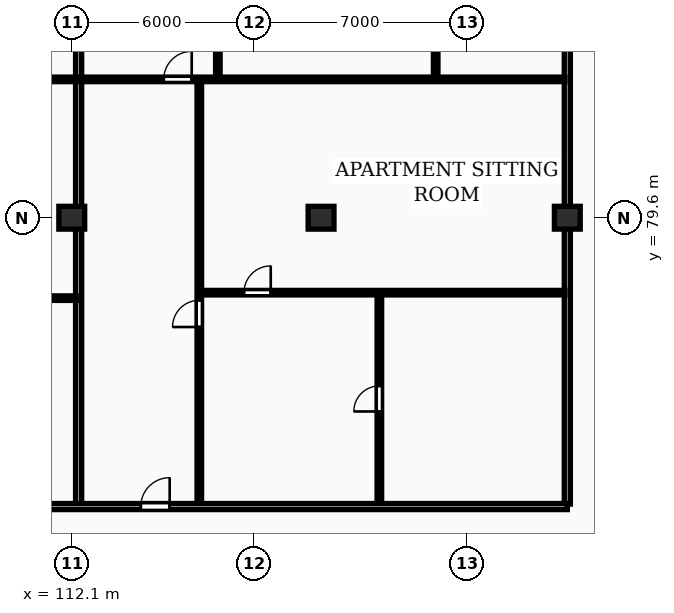
"""IFC4 building model, lengths in metres.
Left out: names, types, materials, properties, quantities, classifications, styles, units other than length and angle.
Written with IfcOpenShell. Run it as: python <this file> out.ifc"""

import sys

from ifc_helpers import new_model, si_unit, direction, frame, frame_2d, origin, origin_2d, place, context, subcontext, project, spatial, rectangle, extrude, element, fill, save


model = new_model("IFC4")
c1 = context("Model", 3, precision=1e-05, world=origin(), true_north=direction((0.0, 1.0)))
c2 = subcontext(c1, "Body", "Model", "MODEL_VIEW")
j1 = project(units=[si_unit("LENGTHUNIT", "METRE"), si_unit("PLANEANGLEUNIT", "RADIAN")], contexts=[c1])
p1 = place(None, origin())
s1 = spatial("IfcSite", under=j1, at=p1, CompositionType="ELEMENT")
p2 = place(p1, origin())
s2 = spatial("IfcBuilding", under=s1, at=p2, CompositionType="ELEMENT")
p3 = place(p2, frame((0.0, 0.0, 201.1)))
s3 = spatial("IfcBuildingStorey", under=s2, at=p3, CompositionType="ELEMENT", Elevation=201.1)
for number, where, z_axis, x_axis in (
    (1, (112.1, 79.6, 0.0), (0.0, 0.0, 1.0), (1.0, 0.0, 0.0)),
    (2, (120.3, 79.6, 0.0), (0.0, 0.0, 1.0), (1.0, 0.0, 0.0)),
    (3, (128.4, 79.6, 0.0), (0.0, 0.0, 1.0), (1.0, 0.0, 0.0)),
):
    element("IfcColumn", number, at=place(p3, frame(where, z_axis=z_axis, x_axis=x_axis)), inside=s3, PredefinedType="COLUMN", context=c2, shape_type="SweptSolid", body=[
        extrude(rectangle(XDim=0.85, YDim=0.75, at=origin_2d()), origin(), (0.0, 0.0, 1.0), 3.25),
    ])
for number, where, z_axis, x_axis in (
    (4, (128.4, 70.18, 0.0), (0.0, 0.0, 1.0), (0.0, 1.0, 0.0)),
    (5, (112.326, 70.18, 0.0), (0.0, 0.0, 1.0), (0.0, 1.0, 0.0)),
):
    element("IfcWall", number, at=place(p3, frame(where, z_axis=z_axis, x_axis=x_axis)), inside=s3, PredefinedType="PARTITIONING", context=c2, shape_type="SweptSolid", body=[
        extrude(rectangle(XDim=24.32, YDim=0.2, at=frame_2d((12.16, 0.0))), origin(), (0.0, 0.0, 1.0), 2.277),
    ])
p4 = place(p3, frame((100.242, 76.955, 0.0), z_axis=(0.0, 0.0, 1.0), x_axis=(1.0, 0.0, 0.0)))
e6 = element("IfcWall", 6, at=p4, inside=s3, PredefinedType="PARTITIONING", context=c2, shape_type="SweptSolid", body=[
    extrude(rectangle(XDim=12.004, YDim=0.15, at=frame_2d((6.002, 0.0))), origin(), (0.0, 0.0, 1.0), 2.97),
])
p5 = place(p4, frame((4.909, 0.0, 0.0)))
e7 = element("IfcOpeningElement", 7, at=p5, cuts=e6, PredefinedType="OPENING", context=c2, shape_type="SweptSolid", body=[
    extrude(rectangle(XDim=0.88, YDim=2.06, at=frame_2d((0.44, 1.03))), frame((0.0, 0.085, 0.0), z_axis=(0.0, -1.0, 0.0), x_axis=(1.0, 0.0, 0.0)), (0.0, 0.0, 1.0), 0.17),
])
p6 = place(p3, frame((96.292, 84.15, 0.0), z_axis=(0.0, 0.0, 1.0), x_axis=(1.0, 0.0, 0.0)))
e8 = element("IfcWall", 8, at=p6, inside=s3, PredefinedType="PARTITIONING", context=c2, shape_type="SweptSolid", body=[
    extrude(rectangle(XDim=15.954, YDim=0.15, at=frame_2d((7.977, 0.0))), origin(), (0.0, 0.0, 1.0), 2.97),
])
p7 = place(p6, frame((2.72, 0.0, 0.0)))
e9 = element("IfcOpeningElement", 9, at=p7, cuts=e8, PredefinedType="OPENING", context=c2, shape_type="SweptSolid", body=[
    extrude(rectangle(XDim=0.92, YDim=2.08, at=frame_2d((0.46, 1.04))), frame((0.0, 0.085, 0.0), z_axis=(0.0, -1.0, 0.0), x_axis=(1.0, 0.0, 0.0)), (0.0, 0.0, 1.0), 0.17),
])
p8 = place(p3, frame((122.218, 70.16, 0.0), z_axis=(0.0, 0.0, 1.0), x_axis=(0.0, 1.0, 0.0)))
e10 = element("IfcWall", 10, at=p8, inside=s3, PredefinedType="PARTITIONING", context=c2, shape_type="SweptSolid", body=[
    extrude(rectangle(XDim=6.975, YDim=0.15, at=frame_2d((3.488, 0.0))), origin(), (0.0, 0.0, 1.0), 2.97),
])
p9 = place(p8, frame((3.067, 0.0, 0.0)))
e11 = element("IfcOpeningElement", 11, at=p9, cuts=e10, PredefinedType="OPENING", context=c2, shape_type="SweptSolid", body=[
    extrude(rectangle(XDim=0.84, YDim=2.04, at=frame_2d((0.42, 1.02))), frame((0.0, 0.085, 0.0), z_axis=(0.0, -1.0, 0.0), x_axis=(1.0, 0.0, 0.0)), (0.0, 0.0, 1.0), 0.17),
])
p10 = place(p3, frame((116.356, 77.135, 0.0), z_axis=(0.0, 0.0, 1.0), x_axis=(1.0, 0.0, 0.0)))
e12 = element("IfcWall", 12, at=p10, inside=s3, PredefinedType="PARTITIONING", context=c2, shape_type="SweptSolid", body=[
    extrude(rectangle(XDim=11.964, YDim=0.15, at=frame_2d((5.982, 0.0))), origin(), (0.0, 0.0, 1.0), 2.97),
])
p11 = place(p10, frame((1.409, 0.0, 0.0)))
e13 = element("IfcOpeningElement", 13, at=p11, cuts=e12, PredefinedType="OPENING", context=c2, shape_type="SweptSolid", body=[
    extrude(rectangle(XDim=0.88, YDim=2.06, at=frame_2d((0.44, 1.03))), frame((0.0, 0.085, 0.0), z_axis=(0.0, -1.0, 0.0), x_axis=(1.0, 0.0, 0.0)), (0.0, 0.0, 1.0), 0.17),
])
p12 = place(p3, frame((116.296, 70.16, 0.0), z_axis=(0.0, 0.0, 1.0), x_axis=(0.0, 1.0, 0.0)))
e14 = element("IfcWall", 14, at=p12, inside=s3, PredefinedType="PARTITIONING", context=c2, shape_type="SweptSolid", body=[
    extrude(rectangle(XDim=13.95, YDim=0.15, at=frame_2d((6.975, 0.0))), origin(), (0.0, 0.0, 1.0), 2.97),
])
p13 = place(p12, frame((5.845, 0.0, 0.0)))
e15 = element("IfcOpeningElement", 15, at=p13, cuts=e14, PredefinedType="OPENING", context=c2, shape_type="SweptSolid", body=[
    extrude(rectangle(XDim=0.88, YDim=2.06, at=frame_2d((0.44, 1.03))), frame((0.0, 0.085, 0.0), z_axis=(0.0, -1.0, 0.0), x_axis=(1.0, 0.0, 0.0)), (0.0, 0.0, 1.0), 0.17),
])
p14 = place(p3, frame((116.906, 84.19, 0.0), z_axis=(0.0, 0.0, 1.0), x_axis=(0.0, 1.0, 0.0)))
e16 = element("IfcWall", 16, at=p14, inside=s3, PredefinedType="PARTITIONING", context=c2, shape_type="SweptSolid", body=[
    extrude(rectangle(XDim=10.31, YDim=0.15, at=frame_2d((5.155, 0.0))), origin(), (0.0, 0.0, 1.0), 2.97),
])
p15 = place(p14, frame((3.82, 0.0, 0.0)))
e17 = element("IfcOpeningElement", 17, at=p15, cuts=e16, PredefinedType="OPENING", context=c2, shape_type="SweptSolid", body=[
    extrude(rectangle(XDim=0.92, YDim=2.08, at=frame_2d((0.46, 1.04))), frame((0.0, 0.085, 0.0), z_axis=(0.0, -1.0, 0.0), x_axis=(1.0, 0.0, 0.0)), (0.0, 0.0, 1.0), 0.17),
])
p16 = place(p3, frame((124.07, 84.19, 0.0), z_axis=(0.0, 0.0, 1.0), x_axis=(0.0, 1.0, 0.0)))
e18 = element("IfcWall", 18, at=p16, inside=s3, PredefinedType="PARTITIONING", context=c2, shape_type="SweptSolid", body=[
    extrude(rectangle(XDim=2.58, YDim=0.15, at=frame_2d((1.29, 0.0))), origin(), (0.0, 0.0, 1.0), 2.97),
])
p17 = place(p3, frame((112.406, 84.15, 0.0), z_axis=(0.0, 0.0, 1.0), x_axis=(1.0, 0.0, 0.0)))
e19 = element("IfcWall", 19, at=p17, inside=s3, PredefinedType="PARTITIONING", context=c2, shape_type="SweptSolid", body=[
    extrude(rectangle(XDim=15.915, YDim=0.15, at=frame_2d((7.957, 0.0))), origin(), (0.0, 0.0, 1.0), 2.97),
])
p18 = place(p17, frame((2.72, 0.0, 0.0)))
e20 = element("IfcOpeningElement", 20, at=p18, cuts=e19, PredefinedType="OPENING", context=c2, shape_type="SweptSolid", body=[
    extrude(rectangle(XDim=0.92, YDim=2.08, at=frame_2d((0.46, 1.04))), frame((0.0, 0.085, 0.0), z_axis=(0.0, -1.0, 0.0), x_axis=(1.0, 0.0, 0.0)), (0.0, 0.0, 1.0), 0.17),
])
p19 = place(p3, frame((59.8, 70.1, 0.0), z_axis=(0.0, 0.0, 1.0), x_axis=(1.0, 0.0, 0.0)))
e21 = element("IfcWall", 21, at=p19, inside=s3, PredefinedType="PARTITIONING", context=c2, shape_type="SweptSolid", body=[
    extrude(rectangle(XDim=68.6, YDim=0.2, at=frame_2d((34.3, 0.0))), origin(), (0.0, 0.0, 1.0), 2.97),
])
p20 = place(p19, frame((7.281, 0.0, 0.0)))
e22 = element("IfcOpeningElement", 22, at=p20, cuts=e21, PredefinedType="OPENING", context=c2, shape_type="SweptSolid", body=[
    extrude(rectangle(XDim=1.22, YDim=2.18, at=frame_2d((0.61, 1.09))), frame((0.0, 0.11, 0.0), z_axis=(0.0, -1.0, 0.0), x_axis=(1.0, 0.0, 0.0)), (0.0, 0.0, 1.0), 0.22),
])
p21 = place(p19, frame((25.602, 0.0, 0.0)))
e23 = element("IfcOpeningElement", 23, at=p21, cuts=e21, PredefinedType="OPENING", context=c2, shape_type="SweptSolid", body=[
    extrude(rectangle(XDim=1.22, YDim=2.18, at=frame_2d((0.61, 1.09))), frame((0.0, 0.11, 0.0), z_axis=(0.0, -1.0, 0.0), x_axis=(1.0, 0.0, 0.0)), (0.0, 0.0, 1.0), 0.22),
])
p22 = place(p19, frame((38.457, 0.0, 0.0)))
e24 = element("IfcOpeningElement", 24, at=p22, cuts=e21, PredefinedType="OPENING", context=c2, shape_type="SweptSolid", body=[
    extrude(rectangle(XDim=0.95, YDim=2.15, at=frame_2d((0.475, 1.075))), frame((0.0, 0.11, 0.0), z_axis=(0.0, -1.0, 0.0), x_axis=(1.0, 0.0, 0.0)), (0.0, 0.0, 1.0), 0.22),
])
p23 = place(p19, frame((54.571, 0.0, 0.0)))
e25 = element("IfcOpeningElement", 25, at=p23, cuts=e21, PredefinedType="OPENING", context=c2, shape_type="SweptSolid", body=[
    extrude(rectangle(XDim=0.95, YDim=2.15, at=frame_2d((0.475, 1.075))), frame((0.0, 0.11, 0.0), z_axis=(0.0, -1.0, 0.0), x_axis=(1.0, 0.0, 0.0)), (0.0, 0.0, 1.0), 0.22),
])
p24 = place(p9, origin())
e26 = element("IfcDoor", 26, at=p24, inside=s3, OperationType="SINGLE_SWING_LEFT", PredefinedType="DOOR", context=c2, shape_type="SweptSolid", body=[
    extrude(rectangle(XDim=0.84, YDim=2.04, at=frame_2d((0.42, 1.02))), frame((0.0, 0.025, 0.0), z_axis=(0.0, -1.0, 0.0), x_axis=(1.0, 0.0, 0.0)), (0.0, 0.0, 1.0), 0.05),
])
fill(e11, e26)
p25 = place(p11, origin())
e27 = element("IfcDoor", 27, at=p25, inside=s3, OperationType="SINGLE_SWING_RIGHT", PredefinedType="DOOR", context=c2, shape_type="SweptSolid", body=[
    extrude(rectangle(XDim=0.88, YDim=2.06, at=frame_2d((0.44, 1.03))), frame((0.0, 0.025, 0.0), z_axis=(0.0, -1.0, 0.0), x_axis=(1.0, 0.0, 0.0)), (0.0, 0.0, 1.0), 0.05),
])
fill(e13, e27)
p26 = place(p13, origin())
e28 = element("IfcDoor", 28, at=p26, inside=s3, OperationType="SINGLE_SWING_LEFT", PredefinedType="DOOR", context=c2, shape_type="SweptSolid", body=[
    extrude(rectangle(XDim=0.88, YDim=2.06, at=frame_2d((0.44, 1.03))), frame((0.0, 0.025, 0.0), z_axis=(0.0, -1.0, 0.0), x_axis=(1.0, 0.0, 0.0)), (0.0, 0.0, 1.0), 0.05),
])
fill(e15, e28)
p27 = place(p18, origin())
e29 = element("IfcDoor", 29, at=p27, inside=s3, OperationType="SINGLE_SWING_RIGHT", PredefinedType="DOOR", context=c2, shape_type="SweptSolid", body=[
    extrude(rectangle(XDim=0.92, YDim=2.08, at=frame_2d((0.46, 1.04))), frame((0.0, 0.025, 0.0), z_axis=(0.0, -1.0, 0.0), x_axis=(1.0, 0.0, 0.0)), (0.0, 0.0, 1.0), 0.05),
])
fill(e20, e29)
p28 = place(p23, origin())
e30 = element("IfcDoor", 30, at=p28, inside=s3, OperationType="SINGLE_SWING_RIGHT", PredefinedType="DOOR", context=c2, shape_type="SweptSolid", body=[
    extrude(rectangle(XDim=0.95, YDim=2.15, at=frame_2d((0.475, 1.075))), frame((0.0, 0.025, 0.0), z_axis=(0.0, -1.0, 0.0), x_axis=(1.0, 0.0, 0.0)), (0.0, 0.0, 1.0), 0.05),
])
fill(e25, e30)
save(model, sys.argv[1])
